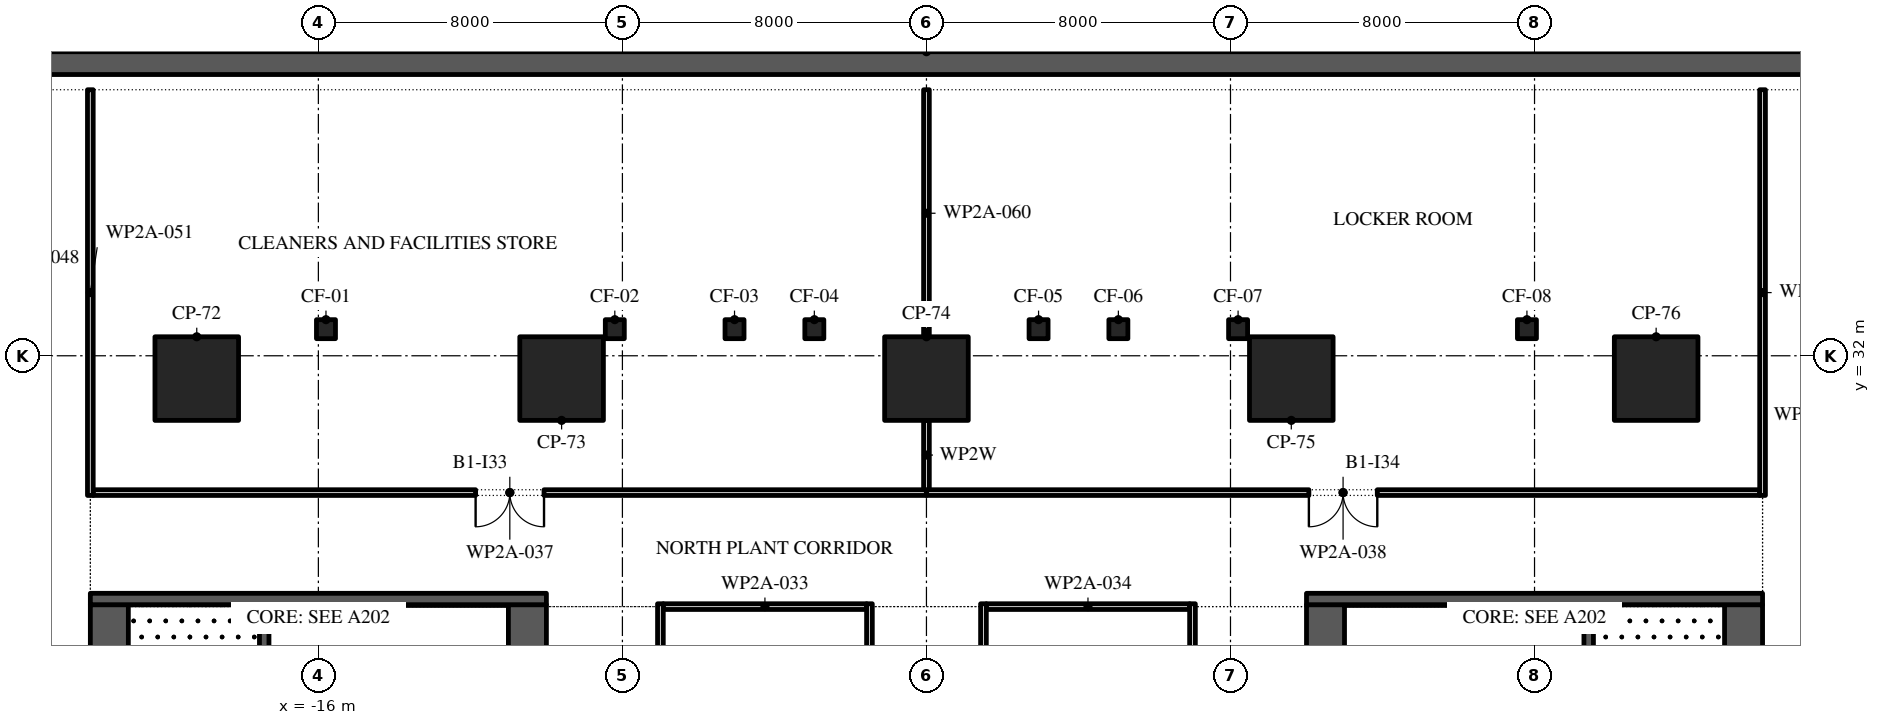
"""IFC4 building model, lengths in metres.
Left out: names, types, materials, properties, quantities, classifications, styles, units other than length and angle.
Written with IfcOpenShell. Run it as: python <this file> out.ifc"""

import sys

from ifc_helpers import new_model, si_unit, direction, frame, frame_2d, origin, origin_2d, place, context, subcontext, project, spatial, rectangle, extrude, element, fill, save


model = new_model("IFC4")
c1 = context("Model", 3, precision=1e-05, world=origin(), true_north=direction((0.0, 1.0)))
c2 = subcontext(c1, "Body", "Model", "MODEL_VIEW")
j1 = project(units=[si_unit("LENGTHUNIT", "METRE"), si_unit("PLANEANGLEUNIT", "RADIAN")], contexts=[c1])
p1 = place(None, origin())
s1 = spatial("IfcSite", under=j1, at=p1, CompositionType="ELEMENT")
p2 = place(p1, origin())
s2 = spatial("IfcBuilding", under=s1, at=p2, CompositionType="ELEMENT")
p3 = place(p2, frame((0.0, 0.0, -5.2)))
s3 = spatial("IfcBuildingStorey", under=s2, at=p3, CompositionType="ELEMENT", Elevation=-5.2)
p4 = place(p3, frame((-48.0, 39.7, 0.0), z_axis=(0.0, 0.0, 1.0), x_axis=(1.0, 0.0, 0.0)))
e1 = element("IfcWall", 1, at=p4, inside=s3, PredefinedType="SOLIDWALL", context=c2, shape_type="SweptSolid", body=[
    extrude(rectangle(XDim=96.0, YDim=0.6, at=frame_2d((48.0, 0.0))), origin(), (0.0, 0.0, 1.0), 4.8),
])
for number, where, z_axis, x_axis in (
    (2, (-15.8, 32.7, 0.0), (0.0, 0.0, 1.0), (1.0, 0.0, 0.0)),
    (3, (-8.2, 32.7, 0.0), (0.0, 0.0, 1.0), (1.0, 0.0, 0.0)),
    (4, (-5.05, 32.7, 0.0), (0.0, 0.0, 1.0), (1.0, 0.0, 0.0)),
    (5, (-2.95, 32.7, 0.0), (0.0, 0.0, 1.0), (1.0, 0.0, 0.0)),
    (6, (2.95, 32.7, 0.0), (0.0, 0.0, 1.0), (1.0, 0.0, 0.0)),
    (7, (5.05, 32.7, 0.0), (0.0, 0.0, 1.0), (1.0, 0.0, 0.0)),
    (8, (8.2, 32.7, 0.0), (0.0, 0.0, 1.0), (1.0, 0.0, 0.0)),
    (9, (15.8, 32.7, 0.0), (0.0, 0.0, 1.0), (1.0, 0.0, 0.0)),
):
    element("IfcColumn", number, at=place(p3, frame(where, z_axis=z_axis, x_axis=x_axis)), inside=s3, PredefinedType="COLUMN", context=c2, shape_type="SweptSolid", body=[
        extrude(rectangle(XDim=0.5, YDim=0.5, at=origin_2d()), origin(), (0.0, 0.0, 1.0), 5.1),
    ])
for number, where, z_axis, x_axis in (
    (10, (-19.2, 31.4, 0.0), (0.0, 0.0, 1.0), (1.0, 0.0, 0.0)),
    (11, (-9.6, 31.4, 0.0), (0.0, 0.0, 1.0), (1.0, 0.0, 0.0)),
    (12, (0.0, 31.4, 0.0), (0.0, 0.0, 1.0), (1.0, 0.0, 0.0)),
    (13, (9.6, 31.4, 0.0), (0.0, 0.0, 1.0), (1.0, 0.0, 0.0)),
    (14, (19.2, 31.4, 0.0), (0.0, 0.0, 1.0), (1.0, 0.0, 0.0)),
):
    element("IfcColumn", number, at=place(p3, frame(where, z_axis=z_axis, x_axis=x_axis)), inside=s3, PredefinedType="COLUMN", context=c2, shape_type="SweptSolid", body=[
        extrude(rectangle(XDim=2.2, YDim=2.2, at=origin_2d()), origin(), (0.0, 0.0, 1.0), 5.2),
    ])
p5 = place(p3, frame((-21.5, -2.45, 0.0), z_axis=(0.0, 0.0, 1.0), x_axis=(0.0, 1.0, 0.0)))
e15 = element("IfcWall", 15, at=p5, inside=s3, PredefinedType="SHEAR", context=c2, shape_type="SweptSolid", body=[
    extrude(rectangle(XDim=27.9, YDim=1.0, at=frame_2d((13.95, 0.0))), origin(), (0.0, 0.0, 1.0), 4.9),
])
p6 = place(p5, frame((5.05, 0.0, 0.0)))
e16 = element("IfcOpeningElement", 16, at=p6, cuts=e15, PredefinedType="OPENING", context=c2, shape_type="SweptSolid", body=[
    extrude(rectangle(XDim=1.2, YDim=2.1, at=frame_2d((0.6, 1.05))), frame((0.0, 0.51, 0.0), z_axis=(0.0, -1.0, 0.0), x_axis=(1.0, 0.0, 0.0)), (0.0, 0.0, 1.0), 1.02),
])
p7 = place(p5, frame((21.65, 0.0, 0.0)))
e17 = element("IfcOpeningElement", 17, at=p7, cuts=e15, PredefinedType="OPENING", context=c2, shape_type="SweptSolid", body=[
    extrude(rectangle(XDim=1.2, YDim=2.1, at=frame_2d((0.6, 1.05))), frame((0.0, 0.51, 0.0), z_axis=(0.0, -1.0, 0.0), x_axis=(1.0, 0.0, 0.0)), (0.0, 0.0, 1.0), 1.02),
])
p8 = place(p3, frame((-10.5, -2.45, 0.0), z_axis=(0.0, 0.0, 1.0), x_axis=(0.0, 1.0, 0.0)))
e18 = element("IfcWall", 18, at=p8, inside=s3, PredefinedType="SHEAR", context=c2, shape_type="SweptSolid", body=[
    extrude(rectangle(XDim=27.9, YDim=1.0, at=frame_2d((13.95, 0.0))), origin(), (0.0, 0.0, 1.0), 4.9),
])
p9 = place(p8, frame((23.65, 0.0, 0.0)))
e19 = element("IfcOpeningElement", 19, at=p9, cuts=e18, PredefinedType="OPENING", context=c2, shape_type="SweptSolid", body=[
    extrude(rectangle(XDim=2.4, YDim=2.1, at=frame_2d((1.2, 1.05))), frame((0.0, 0.51, 0.0), z_axis=(0.0, -1.0, 0.0), x_axis=(1.0, 0.0, 0.0)), (0.0, 0.0, 1.0), 1.02),
])
p10 = place(p8, frame((0.788, 0.0, 0.0)))
e20 = element("IfcOpeningElement", 20, at=p10, cuts=e18, PredefinedType="OPENING", context=c2, shape_type="SweptSolid", body=[
    extrude(rectangle(XDim=0.9, YDim=2.1, at=frame_2d((0.45, 1.05))), frame((0.0, 0.51, 0.0), z_axis=(0.0, -1.0, 0.0), x_axis=(1.0, 0.0, 0.0)), (0.0, 0.0, 1.0), 1.02),
])
p11 = place(p8, frame((3.962, 0.0, 0.0)))
e21 = element("IfcOpeningElement", 21, at=p11, cuts=e18, PredefinedType="OPENING", context=c2, shape_type="SweptSolid", body=[
    extrude(rectangle(XDim=1.0, YDim=2.1, at=frame_2d((0.5, 1.05))), frame((0.0, 0.51, 0.0), z_axis=(0.0, -1.0, 0.0), x_axis=(1.0, 0.0, 0.0)), (0.0, 0.0, 1.0), 1.02),
])
p12 = place(p3, frame((-22.0, 25.6, 0.0), z_axis=(0.0, 0.0, 1.0), x_axis=(1.0, 0.0, 0.0)))
e22 = element("IfcWall", 22, at=p12, inside=s3, PredefinedType="SHEAR", context=c2, shape_type="SweptSolid", body=[
    extrude(rectangle(XDim=12.0, YDim=0.3, at=frame_2d((6.0, 0.0))), origin(), (0.0, 0.0, 1.0), 4.9),
])
p13 = place(p3, frame((-17.425, 19.15, 0.0), z_axis=(0.0, 0.0, 1.0), x_axis=(0.0, 1.0, 0.0)))
e23 = element("IfcWall", 23, at=p13, inside=s3, PredefinedType="SHEAR", context=c2, shape_type="SweptSolid", body=[
    extrude(rectangle(XDim=6.3, YDim=0.25, at=frame_2d((3.15, 0.0))), origin(), (0.0, 0.0, 1.0), 4.9),
])
p14 = place(p13, frame((0.05, 0.0, 0.0)))
e24 = element("IfcOpeningElement", 24, at=p14, cuts=e23, PredefinedType="OPENING", context=c2, shape_type="SweptSolid", body=[
    extrude(rectangle(XDim=1.2, YDim=2.1, at=frame_2d((0.6, 1.05))), frame((0.0, 0.135, 0.0), z_axis=(0.0, -1.0, 0.0), x_axis=(1.0, 0.0, 0.0)), (0.0, 0.0, 1.0), 0.27),
])
p15 = place(p3, frame((21.5, -2.45, 0.0), z_axis=(0.0, 0.0, 1.0), x_axis=(0.0, 1.0, 0.0)))
e25 = element("IfcWall", 25, at=p15, inside=s3, PredefinedType="SHEAR", context=c2, shape_type="SweptSolid", body=[
    extrude(rectangle(XDim=27.9, YDim=1.0, at=frame_2d((13.95, 0.0))), origin(), (0.0, 0.0, 1.0), 4.9),
])
p16 = place(p15, frame((5.05, 0.0, 0.0)))
e26 = element("IfcOpeningElement", 26, at=p16, cuts=e25, PredefinedType="OPENING", context=c2, shape_type="SweptSolid", body=[
    extrude(rectangle(XDim=1.2, YDim=2.1, at=frame_2d((0.6, 1.05))), frame((0.0, 0.51, 0.0), z_axis=(0.0, -1.0, 0.0), x_axis=(1.0, 0.0, 0.0)), (0.0, 0.0, 1.0), 1.02),
])
p17 = place(p15, frame((21.65, 0.0, 0.0)))
e27 = element("IfcOpeningElement", 27, at=p17, cuts=e25, PredefinedType="OPENING", context=c2, shape_type="SweptSolid", body=[
    extrude(rectangle(XDim=1.2, YDim=2.1, at=frame_2d((0.6, 1.05))), frame((0.0, 0.51, 0.0), z_axis=(0.0, -1.0, 0.0), x_axis=(1.0, 0.0, 0.0)), (0.0, 0.0, 1.0), 1.02),
])
p18 = place(p3, frame((10.5, -2.45, 0.0), z_axis=(0.0, 0.0, 1.0), x_axis=(0.0, 1.0, 0.0)))
e28 = element("IfcWall", 28, at=p18, inside=s3, PredefinedType="SHEAR", context=c2, shape_type="SweptSolid", body=[
    extrude(rectangle(XDim=27.9, YDim=1.0, at=frame_2d((13.95, 0.0))), origin(), (0.0, 0.0, 1.0), 4.9),
])
p19 = place(p18, frame((23.65, 0.0, 0.0)))
e29 = element("IfcOpeningElement", 29, at=p19, cuts=e28, PredefinedType="OPENING", context=c2, shape_type="SweptSolid", body=[
    extrude(rectangle(XDim=2.4, YDim=2.1, at=frame_2d((1.2, 1.05))), frame((0.0, 0.51, 0.0), z_axis=(0.0, -1.0, 0.0), x_axis=(1.0, 0.0, 0.0)), (0.0, 0.0, 1.0), 1.02),
])
p20 = place(p18, frame((1.387, 0.0, 0.0)))
e30 = element("IfcOpeningElement", 30, at=p20, cuts=e28, PredefinedType="OPENING", context=c2, shape_type="SweptSolid", body=[
    extrude(rectangle(XDim=0.9, YDim=2.1, at=frame_2d((0.45, 1.05))), frame((0.0, 0.51, 0.0), z_axis=(0.0, -1.0, 0.0), x_axis=(1.0, 0.0, 0.0)), (0.0, 0.0, 1.0), 1.02),
])
p21 = place(p18, frame((4.562, 0.0, 0.0)))
e31 = element("IfcOpeningElement", 31, at=p21, cuts=e28, PredefinedType="OPENING", context=c2, shape_type="SweptSolid", body=[
    extrude(rectangle(XDim=1.0, YDim=2.1, at=frame_2d((0.5, 1.05))), frame((0.0, 0.51, 0.0), z_axis=(0.0, -1.0, 0.0), x_axis=(1.0, 0.0, 0.0)), (0.0, 0.0, 1.0), 1.02),
])
p22 = place(p3, frame((10.0, 25.6, 0.0), z_axis=(0.0, 0.0, 1.0), x_axis=(1.0, 0.0, 0.0)))
e32 = element("IfcWall", 32, at=p22, inside=s3, PredefinedType="SHEAR", context=c2, shape_type="SweptSolid", body=[
    extrude(rectangle(XDim=12.0, YDim=0.3, at=frame_2d((6.0, 0.0))), origin(), (0.0, 0.0, 1.0), 4.9),
])
p23 = place(p3, frame((17.425, 19.15, 0.0), z_axis=(0.0, 0.0, 1.0), x_axis=(0.0, 1.0, 0.0)))
e33 = element("IfcWall", 33, at=p23, inside=s3, PredefinedType="SHEAR", context=c2, shape_type="SweptSolid", body=[
    extrude(rectangle(XDim=6.3, YDim=0.25, at=frame_2d((3.15, 0.0))), origin(), (0.0, 0.0, 1.0), 4.9),
])
p24 = place(p23, frame((0.05, 0.0, 0.0)))
e34 = element("IfcOpeningElement", 34, at=p24, cuts=e33, PredefinedType="OPENING", context=c2, shape_type="SweptSolid", body=[
    extrude(rectangle(XDim=1.2, YDim=2.1, at=frame_2d((0.6, 1.05))), frame((0.0, 0.135, 0.0), z_axis=(0.0, -1.0, 0.0), x_axis=(1.0, 0.0, 0.0)), (0.0, 0.0, 1.0), 0.27),
])
for number, where, z_axis, x_axis in (
    (35, (-6.925, 25.4, 0.0), (0.0, 0.0, 1.0), (1.0, 0.0, 0.0)),
    (36, (1.575, 25.4, 0.0), (0.0, 0.0, 1.0), (1.0, 0.0, 0.0)),
):
    element("IfcWall", number, at=place(p3, frame(where, z_axis=z_axis, x_axis=x_axis)), inside=s3, PredefinedType="PARTITIONING", context=c2, shape_type="SweptSolid", body=[
        extrude(rectangle(XDim=5.35, YDim=0.15, at=frame_2d((2.675, 0.0))), origin(), (0.0, 0.0, 1.0), 4.9),
    ])
p25 = place(p3, frame((-21.925, 28.4, 0.0), z_axis=(0.0, 0.0, 1.0), x_axis=(1.0, 0.0, 0.0)))
e37 = element("IfcWall", 37, at=p25, inside=s3, PredefinedType="PARTITIONING", context=c2, shape_type="SweptSolid", body=[
    extrude(rectangle(XDim=21.925, YDim=0.15, at=frame_2d((10.962, 0.0))), origin(), (0.0, 0.0, 1.0), 4.9),
])
p26 = place(p25, frame((10.062, 0.0, 0.0)))
e38 = element("IfcOpeningElement", 38, at=p26, cuts=e37, PredefinedType="OPENING", context=c2, shape_type="SweptSolid", body=[
    extrude(rectangle(XDim=1.8, YDim=2.1, at=frame_2d((0.9, 1.05))), frame((0.0, 0.085, 0.0), z_axis=(0.0, -1.0, 0.0), x_axis=(1.0, 0.0, 0.0)), (0.0, 0.0, 1.0), 0.17),
])
p27 = place(p3, frame((0.0, 28.4, 0.0), z_axis=(0.0, 0.0, 1.0), x_axis=(1.0, 0.0, 0.0)))
e39 = element("IfcWall", 39, at=p27, inside=s3, PredefinedType="PARTITIONING", context=c2, shape_type="SweptSolid", body=[
    extrude(rectangle(XDim=21.925, YDim=0.15, at=frame_2d((10.962, 0.0))), origin(), (0.0, 0.0, 1.0), 4.9),
])
p28 = place(p27, frame((10.062, 0.0, 0.0)))
e40 = element("IfcOpeningElement", 40, at=p28, cuts=e39, PredefinedType="OPENING", context=c2, shape_type="SweptSolid", body=[
    extrude(rectangle(XDim=1.8, YDim=2.1, at=frame_2d((0.9, 1.05))), frame((0.0, 0.085, 0.0), z_axis=(0.0, -1.0, 0.0), x_axis=(1.0, 0.0, 0.0)), (0.0, 0.0, 1.0), 0.17),
])
p29 = place(p3, frame((-22.0, 28.325, 0.0), z_axis=(0.0, 0.0, 1.0), x_axis=(0.0, 1.0, 0.0)))
e41 = element("IfcWall", 41, at=p29, inside=s3, PredefinedType="PARTITIONING", context=c2, shape_type="SweptSolid", body=[
    extrude(rectangle(XDim=10.675, YDim=0.15, at=frame_2d((5.337, 0.0))), origin(), (0.0, 0.0, 1.0), 4.9),
])
p30 = place(p3, frame((-7.0, -4.075, 0.0), z_axis=(0.0, 0.0, 1.0), x_axis=(0.0, 1.0, 0.0)))
e42 = element("IfcWall", 42, at=p30, inside=s3, PredefinedType="PARTITIONING", context=c2, shape_type="SweptSolid", body=[
    extrude(rectangle(XDim=29.55, YDim=0.15, at=frame_2d((14.775, 0.0))), origin(), (0.0, 0.0, 1.0), 4.9),
])
p31 = place(p30, frame((13.875, 0.0, 0.0)))
e43 = element("IfcOpeningElement", 43, at=p31, cuts=e42, PredefinedType="OPENING", context=c2, shape_type="SweptSolid", body=[
    extrude(rectangle(XDim=1.8, YDim=2.1, at=frame_2d((0.9, 1.05))), frame((0.0, 0.085, 0.0), z_axis=(0.0, -1.0, 0.0), x_axis=(1.0, 0.0, 0.0)), (0.0, 0.0, 1.0), 0.17),
])
p32 = place(p3, frame((-1.5, -6.0, 0.0), z_axis=(0.0, 0.0, 1.0), x_axis=(0.0, 1.0, 0.0)))
e44 = element("IfcWall", 44, at=p32, inside=s3, PredefinedType="PARTITIONING", context=c2, shape_type="SweptSolid", body=[
    extrude(rectangle(XDim=31.475, YDim=0.15, at=frame_2d((15.738, 0.0))), origin(), (0.0, 0.0, 1.0), 4.9),
])
p33 = place(p3, frame((0.0, 28.475, 0.0), z_axis=(0.0, 0.0, 1.0), x_axis=(0.0, 1.0, 0.0)))
e45 = element("IfcWall", 45, at=p33, inside=s3, PredefinedType="PARTITIONING", context=c2, shape_type="SweptSolid", body=[
    extrude(rectangle(XDim=1.825, YDim=0.15, at=frame_2d((0.913, 0.0))), origin(), (0.0, 0.0, 1.0), 4.49),
])
p34 = place(p3, frame((0.0, 32.5, 0.0), z_axis=(0.0, 0.0, 1.0), x_axis=(0.0, 1.0, 0.0)))
e46 = element("IfcWall", 46, at=p34, inside=s3, PredefinedType="PARTITIONING", context=c2, shape_type="SweptSolid", body=[
    extrude(rectangle(XDim=6.5, YDim=0.15, at=frame_2d((3.25, 0.0))), origin(), (0.0, 0.0, 1.0), 4.9),
])
p35 = place(p3, frame((1.5, -10.0, 0.0), z_axis=(0.0, 0.0, 1.0), x_axis=(0.0, 1.0, 0.0)))
e47 = element("IfcWall", 47, at=p35, inside=s3, PredefinedType="PARTITIONING", context=c2, shape_type="SweptSolid", body=[
    extrude(rectangle(XDim=35.475, YDim=0.15, at=frame_2d((17.738, 0.0))), origin(), (0.0, 0.0, 1.0), 4.9),
])
p36 = place(p35, frame((16.837, 0.0, 0.0)))
e48 = element("IfcOpeningElement", 48, at=p36, cuts=e47, PredefinedType="OPENING", context=c2, shape_type="SweptSolid", body=[
    extrude(rectangle(XDim=1.8, YDim=2.1, at=frame_2d((0.9, 1.05))), frame((0.0, 0.085, 0.0), z_axis=(0.0, -1.0, 0.0), x_axis=(1.0, 0.0, 0.0)), (0.0, 0.0, 1.0), 0.17),
])
p37 = place(p3, frame((7.0, -4.075, 0.0), z_axis=(0.0, 0.0, 1.0), x_axis=(0.0, 1.0, 0.0)))
e49 = element("IfcWall", 49, at=p37, inside=s3, PredefinedType="PARTITIONING", context=c2, shape_type="SweptSolid", body=[
    extrude(rectangle(XDim=29.55, YDim=0.15, at=frame_2d((14.775, 0.0))), origin(), (0.0, 0.0, 1.0), 4.9),
])
p38 = place(p3, frame((22.0, 28.325, 0.0), z_axis=(0.0, 0.0, 1.0), x_axis=(0.0, 1.0, 0.0)))
e50 = element("IfcWall", 50, at=p38, inside=s3, PredefinedType="PARTITIONING", context=c2, shape_type="SweptSolid", body=[
    extrude(rectangle(XDim=10.675, YDim=0.15, at=frame_2d((5.337, 0.0))), origin(), (0.0, 0.0, 1.0), 4.9),
])
p39 = place(p26, frame((1.8, 0.0, 0.0), z_axis=(0.0, 0.0, 1.0), x_axis=(-1.0, 0.0, 0.0)))
e51 = element("IfcDoor", 51, at=p39, inside=s3, OperationType="SINGLE_SWING_LEFT", PredefinedType="DOOR", context=c2, shape_type="SweptSolid", body=[
    extrude(rectangle(XDim=1.8, YDim=2.1, at=frame_2d((0.9, 1.05))), frame((0.0, 0.025, 0.0), z_axis=(0.0, -1.0, 0.0), x_axis=(1.0, 0.0, 0.0)), (0.0, 0.0, 1.0), 0.05),
])
fill(e38, e51)
p40 = place(p28, frame((1.8, 0.0, 0.0), z_axis=(0.0, 0.0, 1.0), x_axis=(-1.0, 0.0, 0.0)))
e52 = element("IfcDoor", 52, at=p40, inside=s3, OperationType="SINGLE_SWING_RIGHT", PredefinedType="DOOR", context=c2, shape_type="SweptSolid", body=[
    extrude(rectangle(XDim=1.8, YDim=2.1, at=frame_2d((0.9, 1.05))), frame((0.0, 0.025, 0.0), z_axis=(0.0, -1.0, 0.0), x_axis=(1.0, 0.0, 0.0)), (0.0, 0.0, 1.0), 0.05),
])
fill(e40, e52)
save(model, sys.argv[1])
